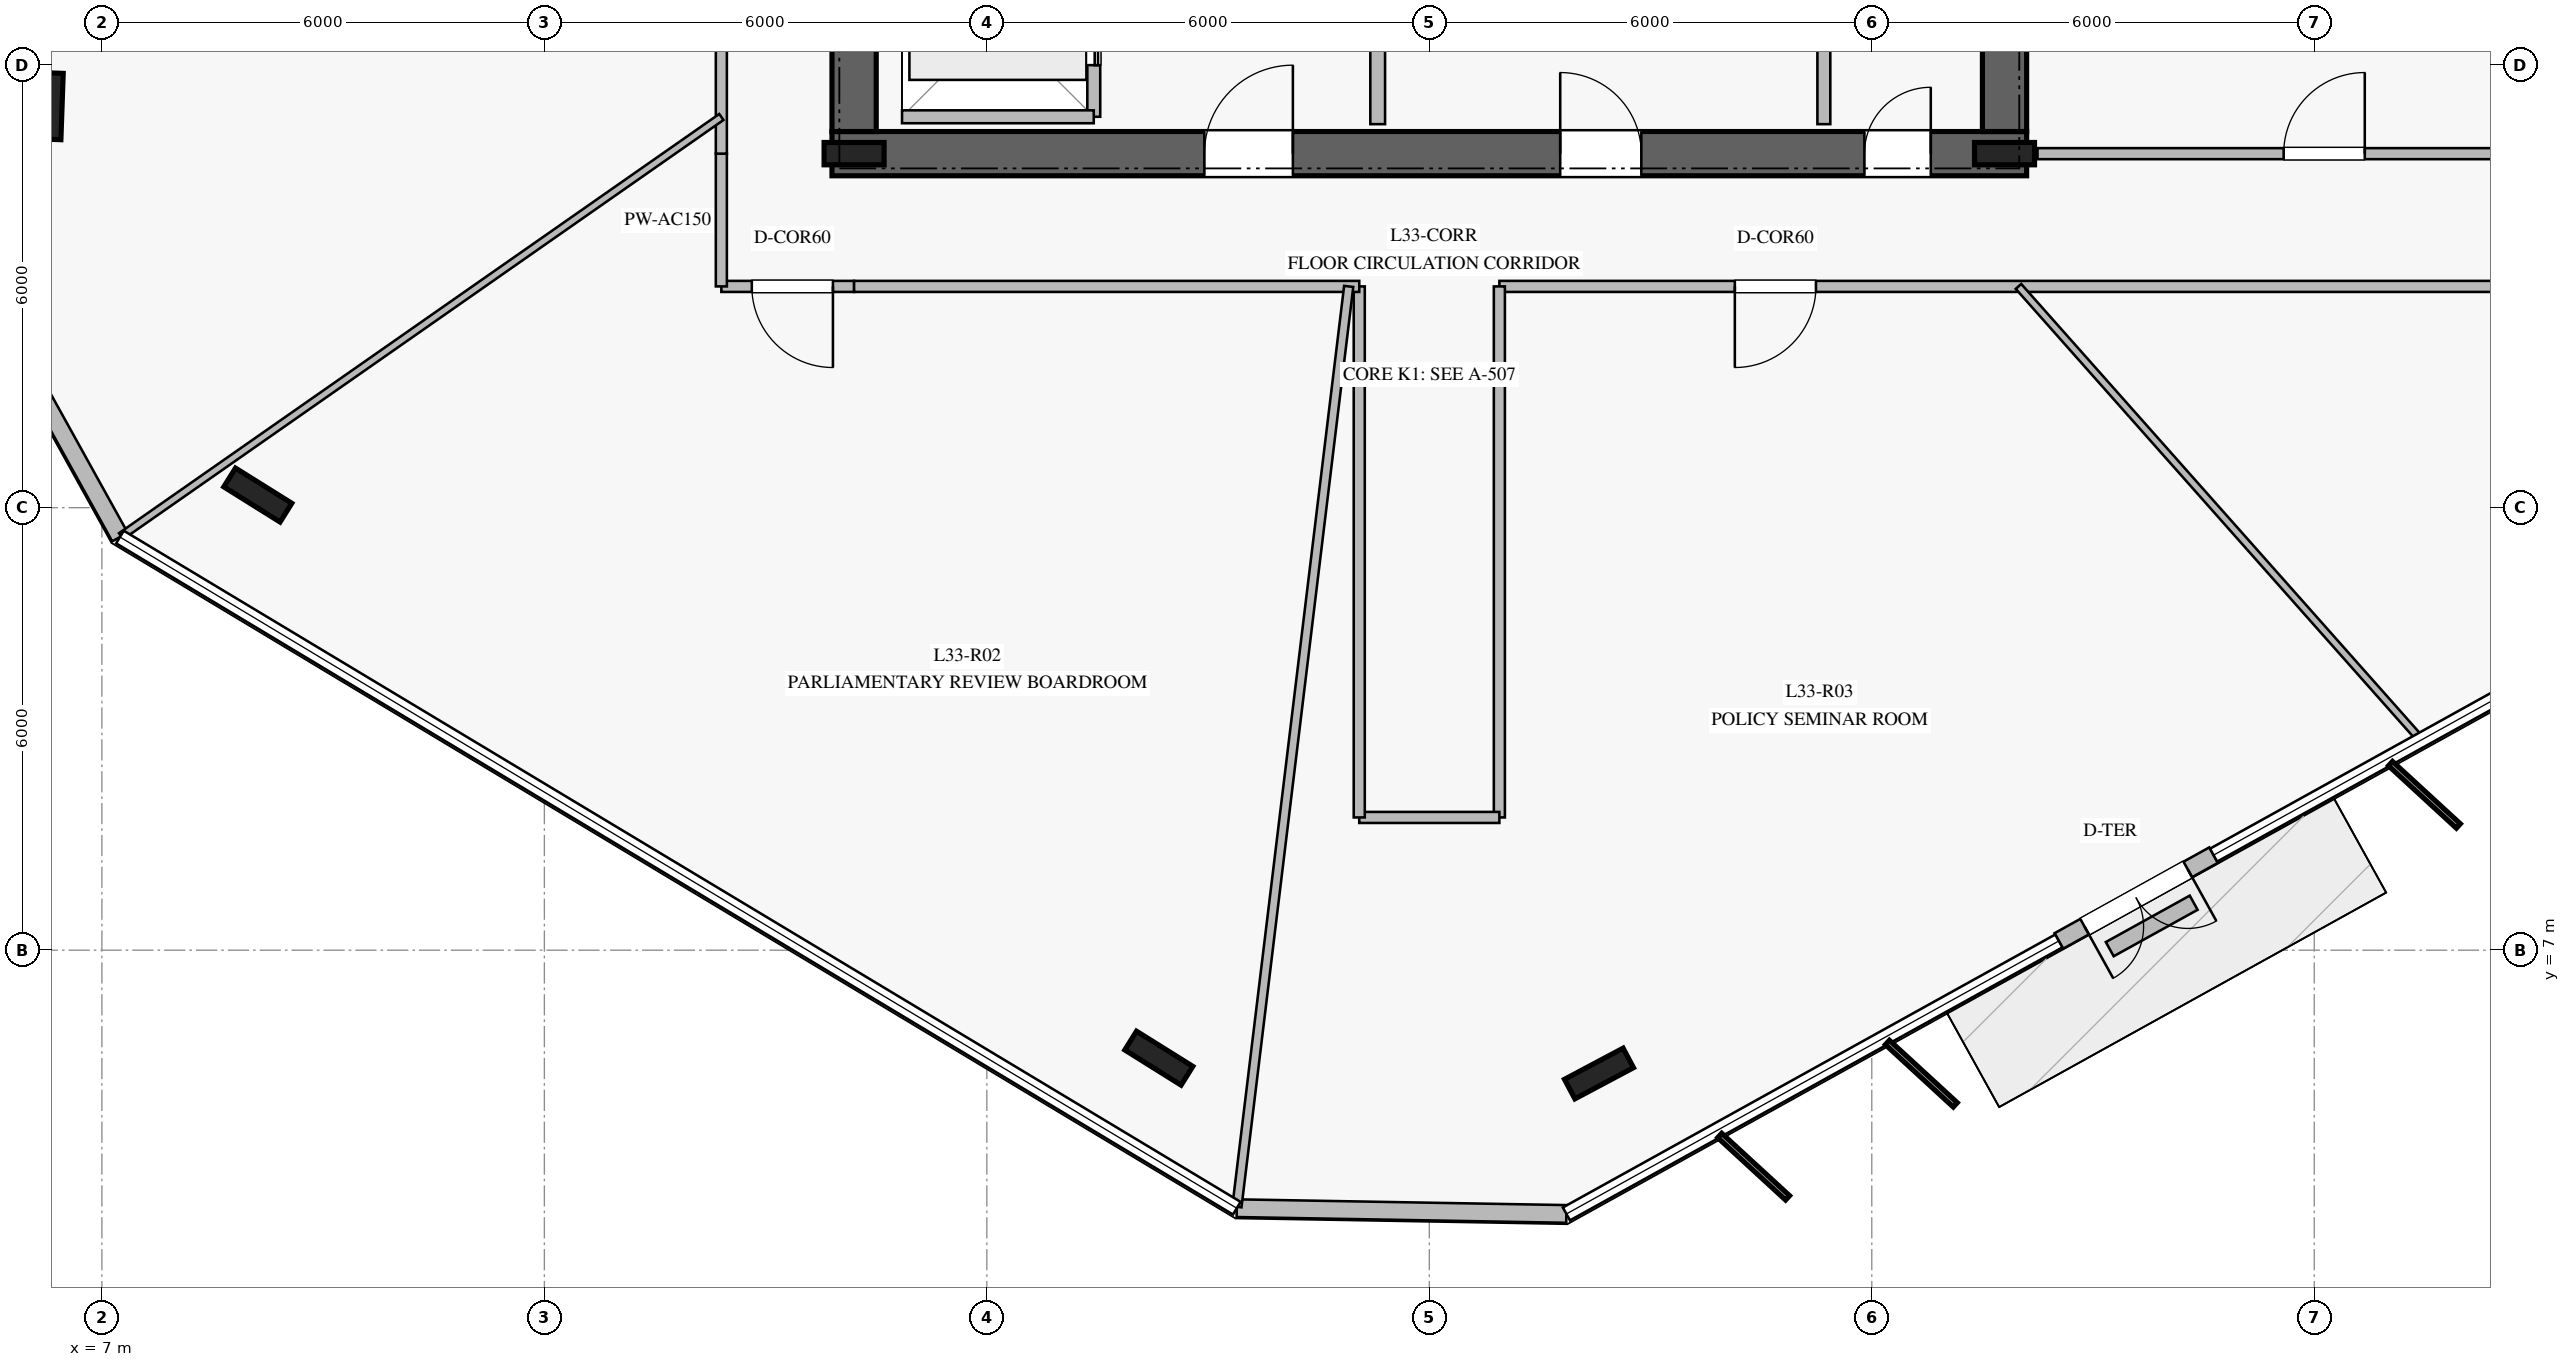
"""IFC4 building model, lengths in metres.
Left out: names, types, materials, properties, quantities, classifications, styles, units other than length and angle.
Written with IfcOpenShell. Run it as: python <this file> out.ifc"""

import sys

from ifc_helpers import new_model, si_unit, direction, frame, frame_2d, origin, origin_2d, place, context, subcontext, project, spatial, rectangle, i_section, extrude, element, fill, save


model = new_model("IFC4")
c1 = context("Model", 3, precision=1e-05, world=origin(), true_north=direction((0.0, 1.0)))
c2 = subcontext(c1, "Body", "Model", "MODEL_VIEW")
j1 = project(units=[si_unit("LENGTHUNIT", "METRE"), si_unit("PLANEANGLEUNIT", "RADIAN")], contexts=[c1])
p1 = place(None, origin())
s1 = spatial("IfcSite", under=j1, at=p1, CompositionType="ELEMENT")
p2 = place(p1, origin())
s2 = spatial("IfcBuilding", under=s1, at=p2, CompositionType="ELEMENT")
p3 = place(p2, frame((0.0, 0.0, 138.4)))
s3 = spatial("IfcBuildingStorey", under=s2, at=p3, CompositionType="ELEMENT", Elevation=138.4)
p4 = place(p3, frame((16.9, 17.8, 0.0), z_axis=(0.0, 0.0, 1.0), x_axis=(1.0, 0.0, 0.0)))
e1 = element("IfcWall", 1, at=p4, inside=s3, PredefinedType="SHEAR", context=c2, shape_type="SweptSolid", body=[
    extrude(rectangle(XDim=16.2, YDim=0.6, at=frame_2d((8.1, 0.0))), origin(), (0.0, 0.0, 1.0), 3.76),
])
p5 = place(p4, frame((5.05, 0.0, 0.0)))
e2 = element("IfcOpeningElement", 2, at=p5, cuts=e1, PredefinedType="OPENING", context=c2, shape_type="SweptSolid", body=[
    extrude(rectangle(XDim=1.2, YDim=2.25, at=frame_2d((0.6, 1.125))), frame((0.0, 0.31, 0.0), z_axis=(0.0, -1.0, 0.0), x_axis=(1.0, 0.0, 0.0)), (0.0, 0.0, 1.0), 0.62),
])
p6 = place(p4, frame((14.0, 0.0, 0.0)))
e3 = element("IfcOpeningElement", 3, at=p6, cuts=e1, PredefinedType="OPENING", context=c2, shape_type="SweptSolid", body=[
    extrude(rectangle(XDim=0.9, YDim=2.1, at=frame_2d((0.45, 1.05))), frame((0.0, 0.31, 0.0), z_axis=(0.0, -1.0, 0.0), x_axis=(1.0, 0.0, 0.0)), (0.0, 0.0, 1.0), 0.62),
])
p7 = place(p4, frame((9.875, 0.0, 0.0)))
e4 = element("IfcOpeningElement", 4, at=p7, cuts=e1, PredefinedType="OPENING", context=c2, shape_type="SweptSolid", body=[
    extrude(rectangle(XDim=1.1, YDim=2.2, at=frame_2d((0.55, 1.1))), frame((0.0, 0.31, 0.0), z_axis=(0.0, -1.0, 0.0), x_axis=(1.0, 0.0, 0.0)), (0.0, 0.0, 1.0), 0.62),
])
p8 = place(p3, frame((17.2, 31.9, 0.0), z_axis=(0.0, 0.0, 1.0), x_axis=(0.0, -1.0, 0.0)))
e5 = element("IfcWall", 5, at=p8, inside=s3, PredefinedType="SHEAR", context=c2, shape_type="SweptSolid", body=[
    extrude(rectangle(XDim=13.8, YDim=0.6, at=frame_2d((6.9, 0.0))), origin(), (0.0, 0.0, 1.0), 3.76),
])
p9 = place(p8, frame((2.05, 0.0, 0.0)))
e6 = element("IfcOpeningElement", 6, at=p9, cuts=e5, PredefinedType="OPENING", context=c2, shape_type="SweptSolid", body=[
    extrude(rectangle(XDim=1.5, YDim=2.2, at=frame_2d((0.75, 1.1))), frame((0.0, 0.31, 0.0), z_axis=(0.0, -1.0, 0.0), x_axis=(1.0, 0.0, 0.0)), (0.0, 0.0, 1.0), 0.62),
])
p10 = place(p3, frame((32.8, 18.1, 0.0), z_axis=(0.0, 0.0, 1.0), x_axis=(0.0, 1.0, 0.0)))
e7 = element("IfcWall", 7, at=p10, inside=s3, PredefinedType="SHEAR", context=c2, shape_type="SweptSolid", body=[
    extrude(rectangle(XDim=13.8, YDim=0.6, at=frame_2d((6.9, 0.0))), origin(), (0.0, 0.0, 1.0), 3.76),
])
for number, where, z_axis, x_axis in (
    (8, (17.2, 17.8, 0.0), (0.0, 0.0, 1.0), (1.0, 0.0, 0.0)),
    (9, (32.8, 17.8, 0.0), (0.0, 0.0, 1.0), (1.0, 0.0, 0.0)),
):
    element("IfcColumn", number, at=place(p3, frame(where, z_axis=z_axis, x_axis=x_axis)), inside=s3, PredefinedType="COLUMN", context=c2, shape_type="SweptSolid", body=[
        extrude(i_section(OverallWidth=0.303, OverallDepth=0.814, WebThickness=0.021, FlangeThickness=0.04, at=origin_2d()), origin(), (0.0, 0.0, 1.0), 4.0),
    ])
for number, where, z_axis, x_axis in (
    (10, (6.31, 18.444, 0.0), (0.0, 0.0, 1.0), (0.035, 0.999, 0.0)),
    (11, (9.114, 13.171, 0.0), (0.0, 0.0, 1.0), (-0.848, 0.53, 0.0)),
    (12, (21.332, 5.536, 0.0), (0.0, 0.0, 1.0), (-0.848, 0.53, 0.0)),
    (13, (27.301, 5.328, 0.0), (0.0, 0.0, 1.0), (0.883, 0.469, 0.0)),
):
    element("IfcColumn", number, at=place(p3, frame(where, z_axis=z_axis, x_axis=x_axis)), inside=s3, PredefinedType="COLUMN", context=c2, shape_type="SweptSolid", body=[
        extrude(i_section(OverallWidth=0.3, OverallDepth=0.9, WebThickness=0.019, FlangeThickness=0.035, at=origin_2d()), origin(), (0.0, 0.0, 1.0), 4.0),
    ])
p11 = place(p3, frame((5.077, 16.512, 0.0), z_axis=(0.0, 0.0, 1.0), x_axis=(0.484965863304, -0.874533081953, 0.0)))
e14 = element("IfcWall", 14, at=p11, inside=s3, PredefinedType="STANDARD", context=c2, shape_type="SweptSolid", body=[
    extrude(rectangle(XDim=4.471, YDim=0.24, at=frame_2d((2.235, 0.0))), origin(), (0.0, 0.0, 1.0), 3.76),
])
p12 = place(p3, frame((22.389, 3.502, 0.0), z_axis=(0.0, 0.0, 1.0), x_axis=(0.999848251902, -0.017420481313, 0.0)))
e15 = element("IfcWall", 15, at=p12, inside=s3, PredefinedType="STANDARD", context=c2, shape_type="SweptSolid", body=[
    extrude(rectangle(XDim=4.471, YDim=0.24, at=frame_2d((2.235, 0.0))), origin(), (0.0, 0.0, 1.0), 3.76),
])
p13 = place(p3, frame((33.536, 7.125, 0.0), z_axis=(0.0, 0.0, 1.0), x_axis=(0.874531244889, 0.484969176044, 0.0)))
e16 = element("IfcWall", 16, at=p13, inside=s3, PredefinedType="STANDARD", context=c2, shape_type="SweptSolid", body=[
    extrude(rectangle(XDim=2.4, YDim=0.24, at=frame_2d((1.2, 0.0))), origin(), (0.0, 0.0, 1.0), 3.76),
])
p14 = place(p13, frame((0.4, 0.0, 0.0)))
e17 = element("IfcOpeningElement", 17, at=p14, cuts=e16, PredefinedType="OPENING", context=c2, shape_type="SweptSolid", body=[
    extrude(rectangle(XDim=1.6, YDim=2.25, at=frame_2d((0.8, 1.125))), frame((0.0, 0.13, 0.0), z_axis=(0.0, -1.0, 0.0), x_axis=(1.0, 0.0, 0.0)), (0.0, 0.0, 1.0), 0.26),
])
p15 = place(p3, frame((34.227, 7.014, 0.0), z_axis=(0.0, 0.0, 1.0), x_axis=(0.874829292821, 0.484431324774, 0.0)))
e18 = element("IfcWall", 18, at=p15, inside=s3, PredefinedType="USERDEFINED", context=c2, shape_type="SweptSolid", body=[
    extrude(rectangle(XDim=1.301, YDim=0.22, at=frame_2d((0.65, 0.0))), origin(), (0.0, 0.0, 1.0), 0.4),
])
p16 = place(p3, frame((24.3, 18.2, 0.0), z_axis=(0.0, 0.0, 1.0), x_axis=(0.0, 1.0, 0.0)))
e19 = element("IfcWall", 19, at=p16, inside=s3, PredefinedType="PARTITIONING", context=c2, shape_type="SweptSolid", body=[
    extrude(rectangle(XDim=5.15, YDim=0.2, at=frame_2d((2.575, 0.0))), origin(), (0.0, 0.0, 1.0), 3.76),
])
p17 = place(p3, frame((30.35, 18.2, 0.0), z_axis=(0.0, 0.0, 1.0), x_axis=(0.0, 1.0, 0.0)))
e20 = element("IfcWall", 20, at=p17, inside=s3, PredefinedType="PARTITIONING", context=c2, shape_type="SweptSolid", body=[
    extrude(rectangle(XDim=3.48, YDim=0.175, at=frame_2d((1.74, 0.0))), origin(), (0.0, 0.0, 1.0), 3.76),
])
p18 = place(p3, frame((20.45, 18.3, 0.0), z_axis=(0.0, 0.0, 1.0), x_axis=(0.0, 1.0, 0.0)))
e21 = element("IfcWall", 21, at=p18, inside=s3, PredefinedType="PARTITIONING", context=c2, shape_type="SweptSolid", body=[
    extrude(rectangle(XDim=2.6, YDim=0.175, at=frame_2d((1.3, 0.0))), origin(), (0.0, 0.0, 1.0), 3.76),
])
p19 = place(p18, frame((0.7, 0.0, 0.0)))
e22 = element("IfcOpeningElement", 22, at=p19, cuts=e21, PredefinedType="OPENING", context=c2, shape_type="SweptSolid", body=[
    extrude(rectangle(XDim=1.2, YDim=2.2, at=frame_2d((0.6, 1.1))), frame((0.0, 0.098, 0.0), z_axis=(0.0, -1.0, 0.0), x_axis=(1.0, 0.0, 0.0)), (0.0, 0.0, 1.0), 0.195),
])
p20 = place(p3, frame((17.85, 18.3, 0.0), z_axis=(0.0, 0.0, 1.0), x_axis=(1.0, 0.0, 0.0)))
e23 = element("IfcWall", 23, at=p20, inside=s3, PredefinedType="PARTITIONING", context=c2, shape_type="SweptSolid", body=[
    extrude(rectangle(XDim=2.6, YDim=0.175, at=frame_2d((1.3, 0.0))), origin(), (0.0, 0.0, 1.0), 3.76),
])
p21 = place(p3, frame((17.2, 16.0, 0.0), z_axis=(0.0, 0.0, 1.0), x_axis=(-1.0, 0.0, 0.0)))
e24 = element("IfcWall", 24, at=p21, inside=s3, PredefinedType="PARTITIONING", context=c2, shape_type="SweptSolid", body=[
    extrude(rectangle(XDim=1.8, YDim=0.15, at=frame_2d((0.9, 0.0))), origin(), (0.0, 0.0, 1.0), 3.36),
])
p22 = place(p21, frame((0.287, 0.0, 0.0)))
e25 = element("IfcOpeningElement", 25, at=p22, cuts=e24, PredefinedType="OPENING", context=c2, shape_type="SweptSolid", body=[
    extrude(rectangle(XDim=1.1, YDim=2.2, at=frame_2d((0.55, 1.1))), frame((0.0, 0.085, 0.0), z_axis=(0.0, -1.0, 0.0), x_axis=(1.0, 0.0, 0.0)), (0.0, 0.0, 1.0), 0.17),
])
p23 = place(p3, frame((15.4, 16.0, 0.0), z_axis=(0.0, 0.0, 1.0), x_axis=(0.0, 1.0, 0.0)))
e26 = element("IfcWall", 26, at=p23, inside=s3, PredefinedType="PARTITIONING", context=c2, shape_type="SweptSolid", body=[
    extrude(rectangle(XDim=1.8, YDim=0.15, at=frame_2d((0.9, 0.0))), origin(), (0.0, 0.0, 1.0), 3.21),
])
p24 = place(p3, frame((15.4, 17.8, 0.0), z_axis=(0.0, 0.0, 1.0), x_axis=(0.0, 1.0, 0.0)))
e27 = element("IfcWall", 27, at=p24, inside=s3, PredefinedType="PARTITIONING", context=c2, shape_type="SweptSolid", body=[
    extrude(rectangle(XDim=6.25, YDim=0.15, at=frame_2d((3.125, 0.0))), origin(), (0.0, 0.0, 1.0), 3.21),
])
p25 = place(p24, frame((2.524, 0.0, 0.0)))
e28 = element("IfcOpeningElement", 28, at=p25, cuts=e27, PredefinedType="OPENING", context=c2, shape_type="SweptSolid", body=[
    extrude(rectangle(XDim=1.1, YDim=2.2, at=frame_2d((0.55, 1.1))), frame((0.0, 0.085, 0.0), z_axis=(0.0, -1.0, 0.0), x_axis=(1.0, 0.0, 0.0)), (0.0, 0.0, 1.0), 0.17),
])
p26 = place(p3, frame((33.247, 17.8, 0.0), z_axis=(0.0, 0.0, 1.0), x_axis=(1.0, 0.0, 0.0)))
e29 = element("IfcWall", 29, at=p26, inside=s3, PredefinedType="PARTITIONING", context=c2, shape_type="SweptSolid", body=[
    extrude(rectangle(XDim=7.953, YDim=0.15, at=frame_2d((3.977, 0.0))), origin(), (0.0, 0.0, 1.0), 3.21),
])
p27 = place(p26, frame((3.338, 0.0, 0.0)))
e30 = element("IfcOpeningElement", 30, at=p27, cuts=e29, PredefinedType="OPENING", context=c2, shape_type="SweptSolid", body=[
    extrude(rectangle(XDim=1.1, YDim=2.2, at=frame_2d((0.55, 1.1))), frame((0.0, 0.085, 0.0), z_axis=(0.0, -1.0, 0.0), x_axis=(1.0, 0.0, 0.0)), (0.0, 0.0, 1.0), 0.17),
])
p28 = place(p3, frame((41.2, 16.0, 0.0), z_axis=(0.0, 0.0, 1.0), x_axis=(-1.0, 0.0, 0.0)))
e31 = element("IfcWall", 31, at=p28, inside=s3, PredefinedType="PARTITIONING", context=c2, shape_type="SweptSolid", body=[
    extrude(rectangle(XDim=15.25, YDim=0.15, at=frame_2d((7.625, 0.0))), origin(), (0.0, 0.0, 1.0), 3.21),
])
p29 = place(p28, frame((10.957, 0.0, 0.0)))
e32 = element("IfcOpeningElement", 32, at=p29, cuts=e31, PredefinedType="OPENING", context=c2, shape_type="SweptSolid", body=[
    extrude(rectangle(XDim=1.1, YDim=2.2, at=frame_2d((0.55, 1.1))), frame((0.0, 0.085, 0.0), z_axis=(0.0, -1.0, 0.0), x_axis=(1.0, 0.0, 0.0)), (0.0, 0.0, 1.0), 0.17),
])
p30 = place(p3, frame((25.95, 16.0, 0.0), z_axis=(0.0, 0.0, 1.0), x_axis=(0.0, -1.0, 0.0)))
e33 = element("IfcWall", 33, at=p30, inside=s3, PredefinedType="PARTITIONING", context=c2, shape_type="SweptSolid", body=[
    extrude(rectangle(XDim=7.2, YDim=0.15, at=frame_2d((3.6, 0.0))), origin(), (0.0, 0.0, 1.0), 3.36),
])
p31 = place(p3, frame((25.95, 8.8, 0.0), z_axis=(0.0, 0.0, 1.0), x_axis=(-1.0, 0.0, 0.0)))
e34 = element("IfcWall", 34, at=p31, inside=s3, PredefinedType="PARTITIONING", context=c2, shape_type="SweptSolid", body=[
    extrude(rectangle(XDim=1.9, YDim=0.15, at=frame_2d((0.95, 0.0))), origin(), (0.0, 0.0, 1.0), 3.76),
])
p32 = place(p3, frame((24.05, 8.8, 0.0), z_axis=(0.0, 0.0, 1.0), x_axis=(0.0, 1.0, 0.0)))
e35 = element("IfcWall", 35, at=p32, inside=s3, PredefinedType="PARTITIONING", context=c2, shape_type="SweptSolid", body=[
    extrude(rectangle(XDim=7.2, YDim=0.15, at=frame_2d((3.6, 0.0))), origin(), (0.0, 0.0, 1.0), 3.36),
])
p33 = place(p3, frame((24.05, 16.0, 0.0), z_axis=(0.0, 0.0, 1.0), x_axis=(-1.0, 0.0, 0.0)))
e36 = element("IfcWall", 36, at=p33, inside=s3, PredefinedType="PARTITIONING", context=c2, shape_type="SweptSolid", body=[
    extrude(rectangle(XDim=6.85, YDim=0.15, at=frame_2d((3.425, 0.0))), origin(), (0.0, 0.0, 1.0), 3.21),
])
p34 = place(p3, frame((15.4, 18.297, 0.0), z_axis=(0.0, 0.0, 1.0), x_axis=(-0.819886429215, -0.572526194325, 0.0)))
e37 = element("IfcWall", 37, at=p34, inside=s3, PredefinedType="MOVABLE", context=c2, shape_type="SweptSolid", body=[
    extrude(rectangle(XDim=9.928, YDim=0.1, at=frame_2d((4.964, 0.0))), origin(), (0.0, 0.0, 1.0), 3.16),
])
p35 = place(p3, frame((23.907, 16.0, 0.0), z_axis=(0.0, 0.0, 1.0), x_axis=(-0.120587145305, -0.99270274523, 0.0)))
e38 = element("IfcWall", 38, at=p35, inside=s3, PredefinedType="PARTITIONING", context=c2, shape_type="SweptSolid", body=[
    extrude(rectangle(XDim=12.571, YDim=0.125, at=frame_2d((6.285, 0.0))), origin(), (0.0, 0.0, 1.0), 3.16),
])
p36 = place(p3, frame((32.989, 16.0, 0.0), z_axis=(0.0, 0.0, 1.0), x_axis=(0.663822664729, -0.747890011828, 0.0)))
e39 = element("IfcWall", 39, at=p36, inside=s3, PredefinedType="MOVABLE", context=c2, shape_type="SweptSolid", body=[
    extrude(rectangle(XDim=8.207, YDim=0.1, at=frame_2d((4.104, 0.0))), origin(), (0.0, 0.0, 1.0), 3.02),
])
p37 = place(p14, frame((1.6, 0.0, 0.0), z_axis=(0.0, 0.0, 1.0), x_axis=(-1.0, 0.0, 0.0)))
e40 = element("IfcDoor", 40, at=p37, inside=s3, OperationType="DOUBLE_DOOR_SINGLE_SWING", PredefinedType="DOOR", context=c2, shape_type="SweptSolid", body=[
    extrude(rectangle(XDim=1.6, YDim=2.25, at=frame_2d((0.8, 1.125))), frame((0.0, 0.025, 0.0), z_axis=(0.0, -1.0, 0.0), x_axis=(1.0, 0.0, 0.0)), (0.0, 0.0, 1.0), 0.05),
])
fill(e17, e40)
p38 = place(p5, origin())
e41 = element("IfcDoor", 41, at=p38, inside=s3, OperationType="SINGLE_SWING_RIGHT", PredefinedType="DOOR", context=c2, shape_type="SweptSolid", body=[
    extrude(rectangle(XDim=1.2, YDim=2.25, at=frame_2d((0.6, 1.125))), frame((0.0, 0.025, 0.0), z_axis=(0.0, -1.0, 0.0), x_axis=(1.0, 0.0, 0.0)), (0.0, 0.0, 1.0), 0.05),
])
fill(e2, e41)
p39 = place(p6, origin())
e42 = element("IfcDoor", 42, at=p39, inside=s3, OperationType="SINGLE_SWING_RIGHT", PredefinedType="DOOR", context=c2, shape_type="SweptSolid", body=[
    extrude(rectangle(XDim=0.9, YDim=2.1, at=frame_2d((0.45, 1.05))), frame((0.0, 0.025, 0.0), z_axis=(0.0, -1.0, 0.0), x_axis=(1.0, 0.0, 0.0)), (0.0, 0.0, 1.0), 0.05),
])
fill(e3, e42)
p40 = place(p7, origin())
e43 = element("IfcDoor", 43, at=p40, inside=s3, OperationType="SINGLE_SWING_LEFT", PredefinedType="DOOR", context=c2, shape_type="SweptSolid", body=[
    extrude(rectangle(XDim=1.1, YDim=2.2, at=frame_2d((0.55, 1.1))), frame((0.0, 0.025, 0.0), z_axis=(0.0, -1.0, 0.0), x_axis=(1.0, 0.0, 0.0)), (0.0, 0.0, 1.0), 0.05),
])
fill(e4, e43)
p41 = place(p19, origin())
e44 = element("IfcDoor", 44, at=p41, inside=s3, OperationType="DOUBLE_DOOR_SLIDING", PredefinedType="DOOR", context=c2, shape_type="SweptSolid", body=[
    extrude(rectangle(XDim=1.2, YDim=2.2, at=frame_2d((0.6, 1.1))), frame((0.0, 0.025, 0.0), z_axis=(0.0, -1.0, 0.0), x_axis=(1.0, 0.0, 0.0)), (0.0, 0.0, 1.0), 0.05),
])
fill(e22, e44)
p42 = place(p22, origin())
e45 = element("IfcDoor", 45, at=p42, inside=s3, OperationType="SINGLE_SWING_LEFT", PredefinedType="DOOR", context=c2, shape_type="SweptSolid", body=[
    extrude(rectangle(XDim=1.1, YDim=2.2, at=frame_2d((0.55, 1.1))), frame((0.0, 0.025, 0.0), z_axis=(0.0, -1.0, 0.0), x_axis=(1.0, 0.0, 0.0)), (0.0, 0.0, 1.0), 0.05),
])
fill(e25, e45)
p43 = place(p29, origin())
e46 = element("IfcDoor", 46, at=p43, inside=s3, OperationType="SINGLE_SWING_RIGHT", PredefinedType="DOOR", context=c2, shape_type="SweptSolid", body=[
    extrude(rectangle(XDim=1.1, YDim=2.2, at=frame_2d((0.55, 1.1))), frame((0.0, 0.025, 0.0), z_axis=(0.0, -1.0, 0.0), x_axis=(1.0, 0.0, 0.0)), (0.0, 0.0, 1.0), 0.05),
])
fill(e32, e46)
p44 = place(p27, origin())
e47 = element("IfcDoor", 47, at=p44, inside=s3, OperationType="SINGLE_SWING_RIGHT", PredefinedType="DOOR", context=c2, shape_type="SweptSolid", body=[
    extrude(rectangle(XDim=1.1, YDim=2.2, at=frame_2d((0.55, 1.1))), frame((0.0, 0.025, 0.0), z_axis=(0.0, -1.0, 0.0), x_axis=(1.0, 0.0, 0.0)), (0.0, 0.0, 1.0), 0.05),
])
fill(e30, e47)
save(model, sys.argv[1])
